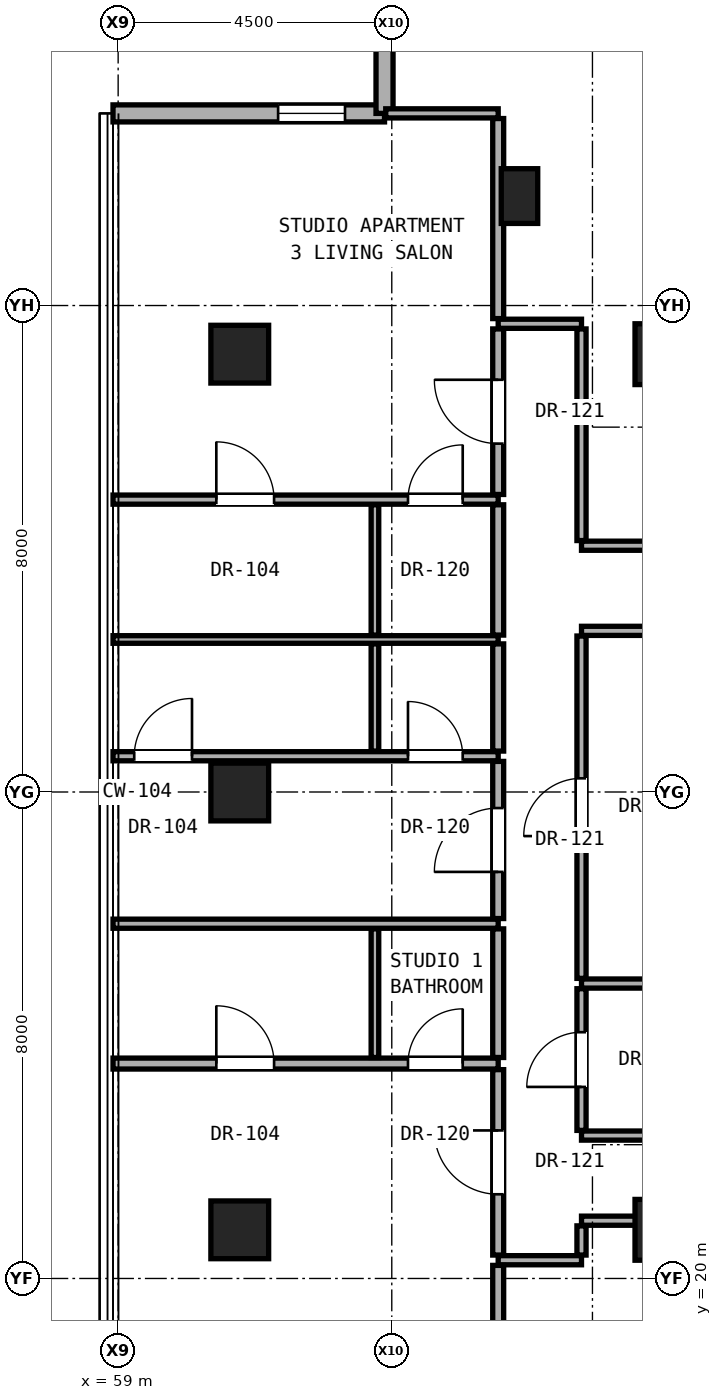
"""IFC4 building model, lengths in metres.
Left out: names, types, materials, properties, quantities, classifications, styles, units other than length and angle.
Written with IfcOpenShell. Run it as: python <this file> out.ifc"""

import sys

from ifc_helpers import new_model, si_unit, direction, frame, frame_2d, origin, origin_2d, place, context, subcontext, project, spatial, rectangle, hollow_rectangle, extrude, element, fill, save


model = new_model("IFC4")
c1 = context("Model", 3, precision=1e-05, world=origin(), true_north=direction((0.0, 1.0)))
c2 = subcontext(c1, "Body", "Model", "MODEL_VIEW")
j1 = project(units=[si_unit("LENGTHUNIT", "METRE"), si_unit("PLANEANGLEUNIT", "RADIAN")], contexts=[c1])
p1 = place(None, origin())
s1 = spatial("IfcSite", under=j1, at=p1, CompositionType="ELEMENT")
p2 = place(p1, origin())
s2 = spatial("IfcBuilding", under=s1, at=p2, CompositionType="ELEMENT")
p3 = place(p2, frame((0.0, 0.0, 167.4)))
s3 = spatial("IfcBuildingStorey", under=s2, at=p3, CompositionType="ELEMENT", Elevation=167.4)
for number, where, z_axis, x_axis in (
    (1, (68.0, 20.8, 0.0), (0.0, 0.0, 1.0), (1.0, 0.0, 0.0)),
    (2, (68.0, 35.2, 0.0), (0.0, 0.0, 1.0), (1.0, 0.0, 0.0)),
):
    element("IfcColumn", number, at=place(p3, frame(where, z_axis=z_axis, x_axis=x_axis)), inside=s3, PredefinedType="COLUMN", context=c2, shape_type="SweptSolid", body=[
        extrude(rectangle(XDim=1.0, YDim=1.0, at=origin_2d()), origin(), (0.0, 0.0, 1.0), 3.25),
    ])
for number, where, z_axis, x_axis in (
    (3, (61.0, 20.8, 0.0), (0.0, 0.0, 1.0), (1.0, 0.0, 0.0)),
    (4, (61.0, 28.0, 0.0), (0.0, 0.0, 1.0), (1.0, 0.0, 0.0)),
    (5, (61.0, 35.2, 0.0), (0.0, 0.0, 1.0), (1.0, 0.0, 0.0)),
):
    element("IfcColumn", number, at=place(p3, frame(where, z_axis=z_axis, x_axis=x_axis)), inside=s3, PredefinedType="COLUMN", context=c2, shape_type="SweptSolid", body=[
        extrude(hollow_rectangle(XDim=0.95, YDim=0.95, WallThickness=0.05, at=origin_2d()), origin(), (0.0, 0.0, 1.0), 3.25),
    ])
p4 = place(p3, frame((65.6, 37.8, 0.0), z_axis=(0.0, 0.0, 1.0), x_axis=(1.0, 0.0, 0.0)))
e6 = element("IfcColumn", 6, at=p4, inside=s3, PredefinedType="PILASTER", context=c2, shape_type="SweptSolid", body=[
    extrude(rectangle(XDim=0.6, YDim=0.9, at=origin_2d()), origin(), (0.0, 0.0, 1.0), 3.25),
])
p5 = place(p3, frame((63.381, 39.159, 0.0), z_axis=(0.0, 0.0, 1.0), x_axis=(-1.0, 0.0, 0.0)))
e7 = element("IfcWall", 7, at=p5, inside=s3, PredefinedType="SOLIDWALL", context=c2, shape_type="SweptSolid", body=[
    extrude(rectangle(XDim=4.465, YDim=0.28, at=frame_2d((2.232, 0.0))), origin(), (0.0, 0.0, 1.0), 3.03),
])
p6 = place(p5, frame((0.65, 0.0, 0.85)))
e8 = element("IfcOpeningElement", 8, at=p6, cuts=e7, PredefinedType="OPENING", context=c2, shape_type="SweptSolid", body=[
    extrude(rectangle(XDim=1.1, YDim=2.0, at=frame_2d((0.55, 1.0))), frame((0.0, 0.15, 0.0), z_axis=(0.0, -1.0, 0.0), x_axis=(1.0, 0.0, 0.0)), (0.0, 0.0, 1.0), 0.3),
])
p7 = place(p3, frame((63.381, 43.625, 0.0), z_axis=(0.0, 0.0, 1.0), x_axis=(0.0, -1.0, 0.0)))
e9 = element("IfcWall", 9, at=p7, inside=s3, PredefinedType="SOLIDWALL", context=c2, shape_type="SweptSolid", body=[
    extrude(rectangle(XDim=4.465, YDim=0.28, at=frame_2d((2.233, 0.0))), origin(), (0.0, 0.0, 1.0), 3.03),
])
p8 = place(p3, frame((65.25, 20.3, 0.0), z_axis=(0.0, 0.0, 1.0), x_axis=(1.0, 0.0, 0.0)))
e10 = element("IfcWall", 10, at=p8, inside=s3, PredefinedType="PARTITIONING", context=c2, shape_type="SweptSolid", body=[
    extrude(rectangle(XDim=1.37, YDim=0.15, at=frame_2d((0.685, 0.0))), origin(), (0.0, 0.0, 1.0), 3.05),
])
p9 = place(p3, frame((66.62, 20.95, 0.0), z_axis=(0.0, 0.0, 1.0), x_axis=(1.0, 0.0, 0.0)))
e11 = element("IfcWall", 11, at=p9, inside=s3, PredefinedType="PARTITIONING", context=c2, shape_type="SweptSolid", body=[
    extrude(rectangle(XDim=1.11, YDim=0.15, at=frame_2d((0.555, 0.0))), origin(), (0.0, 0.0, 1.0), 2.442),
])
p10 = place(p3, frame((66.62, 22.35, 0.0), z_axis=(0.0, 0.0, 1.0), x_axis=(1.0, 0.0, 0.0)))
e12 = element("IfcWall", 12, at=p10, inside=s3, PredefinedType="PARTITIONING", context=c2, shape_type="SweptSolid", body=[
    extrude(rectangle(XDim=10.14, YDim=0.15, at=frame_2d((5.07, 0.0))), origin(), (0.0, 0.0, 1.0), 2.186),
])
p11 = place(p3, frame((58.916, 23.534, 0.0), z_axis=(0.0, 0.0, 1.0), x_axis=(1.0, 0.0, 0.0)))
e13 = element("IfcWall", 13, at=p11, inside=s3, PredefinedType="PARTITIONING", context=c2, shape_type="SweptSolid", body=[
    extrude(rectangle(XDim=6.334, YDim=0.18, at=frame_2d((3.167, 0.0))), origin(), (0.0, 0.0, 1.0), 2.269),
])
p12 = place(p11, frame((1.698, 0.0, 0.0)))
e14 = element("IfcOpeningElement", 14, at=p12, cuts=e13, PredefinedType="OPENING", context=c2, shape_type="SweptSolid", body=[
    extrude(rectangle(XDim=0.95, YDim=2.15, at=frame_2d((0.475, 1.075))), frame((0.0, 0.1, 0.0), z_axis=(0.0, -1.0, 0.0), x_axis=(1.0, 0.0, 0.0)), (0.0, 0.0, 1.0), 0.2),
])
p13 = place(p11, frame((4.851, 0.0, 0.0)))
e15 = element("IfcOpeningElement", 15, at=p13, cuts=e13, PredefinedType="OPENING", context=c2, shape_type="SweptSolid", body=[
    extrude(rectangle(XDim=0.9, YDim=2.1, at=frame_2d((0.45, 1.05))), frame((0.0, 0.1, 0.0), z_axis=(0.0, -1.0, 0.0), x_axis=(1.0, 0.0, 0.0)), (0.0, 0.0, 1.0), 0.2),
])
p14 = place(p3, frame((66.62, 24.85, 0.0), z_axis=(0.0, 0.0, 1.0), x_axis=(1.0, 0.0, 0.0)))
e16 = element("IfcWall", 16, at=p14, inside=s3, PredefinedType="PARTITIONING", context=c2, shape_type="SweptSolid", body=[
    extrude(rectangle(XDim=3.13, YDim=0.15, at=frame_2d((1.565, 0.0))), origin(), (0.0, 0.0, 1.0), 2.186),
])
p15 = place(p3, frame((58.916, 25.834, 0.0), z_axis=(0.0, 0.0, 1.0), x_axis=(1.0, 0.0, 0.0)))
e17 = element("IfcWall", 17, at=p15, inside=s3, PredefinedType="PARTITIONING", context=c2, shape_type="SweptSolid", body=[
    extrude(rectangle(XDim=6.334, YDim=0.15, at=frame_2d((3.167, 0.0))), origin(), (0.0, 0.0, 1.0), 2.269),
])
p16 = place(p3, frame((58.916, 28.588, 0.0), z_axis=(0.0, 0.0, 1.0), x_axis=(1.0, 0.0, 0.0)))
e18 = element("IfcWall", 18, at=p16, inside=s3, PredefinedType="PARTITIONING", context=c2, shape_type="SweptSolid", body=[
    extrude(rectangle(XDim=6.334, YDim=0.15, at=frame_2d((3.167, 0.0))), origin(), (0.0, 0.0, 1.0), 2.269),
])
p17 = place(p16, frame((0.348, 0.0, 0.0)))
e19 = element("IfcOpeningElement", 19, at=p17, cuts=e18, PredefinedType="OPENING", context=c2, shape_type="SweptSolid", body=[
    extrude(rectangle(XDim=0.95, YDim=2.15, at=frame_2d((0.475, 1.075))), frame((0.0, 0.085, 0.0), z_axis=(0.0, -1.0, 0.0), x_axis=(1.0, 0.0, 0.0)), (0.0, 0.0, 1.0), 0.17),
])
p18 = place(p16, frame((4.851, 0.0, 0.0)))
e20 = element("IfcOpeningElement", 20, at=p18, cuts=e18, PredefinedType="OPENING", context=c2, shape_type="SweptSolid", body=[
    extrude(rectangle(XDim=0.9, YDim=2.1, at=frame_2d((0.45, 1.05))), frame((0.0, 0.085, 0.0), z_axis=(0.0, -1.0, 0.0), x_axis=(1.0, 0.0, 0.0)), (0.0, 0.0, 1.0), 0.17),
])
p19 = place(p3, frame((58.916, 30.508, 0.0), z_axis=(0.0, 0.0, 1.0), x_axis=(1.0, 0.0, 0.0)))
e21 = element("IfcWall", 21, at=p19, inside=s3, PredefinedType="PARTITIONING", context=c2, shape_type="SweptSolid", body=[
    extrude(rectangle(XDim=6.334, YDim=0.125, at=frame_2d((3.167, 0.0))), origin(), (0.0, 0.0, 1.0), 2.269),
])
p20 = place(p3, frame((66.62, 30.65, 0.0), z_axis=(0.0, 0.0, 1.0), x_axis=(1.0, 0.0, 0.0)))
e22 = element("IfcWall", 22, at=p20, inside=s3, PredefinedType="PARTITIONING", context=c2, shape_type="SweptSolid", body=[
    extrude(rectangle(XDim=10.14, YDim=0.15, at=frame_2d((5.07, 0.0))), origin(), (0.0, 0.0, 1.0), 2.186),
])
p21 = place(p20, frame((6.14, 0.0, 0.0)))
e23 = element("IfcOpeningElement", 23, at=p21, cuts=e22, PredefinedType="OPENING", context=c2, shape_type="SweptSolid", body=[
    extrude(rectangle(XDim=0.95, YDim=2.15, at=frame_2d((0.475, 1.075))), frame((0.0, 0.085, 0.0), z_axis=(0.0, -1.0, 0.0), x_axis=(1.0, 0.0, 0.0)), (0.0, 0.0, 1.0), 0.17),
])
p22 = place(p3, frame((66.62, 32.05, 0.0), z_axis=(0.0, 0.0, 1.0), x_axis=(1.0, 0.0, 0.0)))
e24 = element("IfcWall", 24, at=p22, inside=s3, PredefinedType="PARTITIONING", context=c2, shape_type="SweptSolid", body=[
    extrude(rectangle(XDim=2.18, YDim=0.15, at=frame_2d((1.09, 0.0))), origin(), (0.0, 0.0, 1.0), 2.186),
])
p23 = place(p3, frame((58.916, 32.808, 0.0), z_axis=(0.0, 0.0, 1.0), x_axis=(1.0, 0.0, 0.0)))
e25 = element("IfcWall", 25, at=p23, inside=s3, PredefinedType="PARTITIONING", context=c2, shape_type="SweptSolid", body=[
    extrude(rectangle(XDim=6.334, YDim=0.15, at=frame_2d((3.167, 0.0))), origin(), (0.0, 0.0, 1.0), 2.269),
])
p24 = place(p23, frame((1.698, 0.0, 0.0)))
e26 = element("IfcOpeningElement", 26, at=p24, cuts=e25, PredefinedType="OPENING", context=c2, shape_type="SweptSolid", body=[
    extrude(rectangle(XDim=0.95, YDim=2.15, at=frame_2d((0.475, 1.075))), frame((0.0, 0.085, 0.0), z_axis=(0.0, -1.0, 0.0), x_axis=(1.0, 0.0, 0.0)), (0.0, 0.0, 1.0), 0.17),
])
p25 = place(p23, frame((4.851, 0.0, 0.0)))
e27 = element("IfcOpeningElement", 27, at=p25, cuts=e25, PredefinedType="OPENING", context=c2, shape_type="SweptSolid", body=[
    extrude(rectangle(XDim=0.9, YDim=2.1, at=frame_2d((0.45, 1.05))), frame((0.0, 0.085, 0.0), z_axis=(0.0, -1.0, 0.0), x_axis=(1.0, 0.0, 0.0)), (0.0, 0.0, 1.0), 0.17),
])
p26 = place(p3, frame((65.25, 35.7, 0.0), z_axis=(0.0, 0.0, 1.0), x_axis=(1.0, 0.0, 0.0)))
e28 = element("IfcWall", 28, at=p26, inside=s3, PredefinedType="PARTITIONING", context=c2, shape_type="SweptSolid", body=[
    extrude(rectangle(XDim=1.37, YDim=0.15, at=frame_2d((0.685, 0.0))), origin(), (0.0, 0.0, 1.0), 3.05),
])
p27 = place(p3, frame((63.401, 39.16, 0.0), z_axis=(0.0, 0.0, 1.0), x_axis=(1.0, 0.0, 0.0)))
e29 = element("IfcWall", 29, at=p27, inside=s3, PredefinedType="PARTITIONING", context=c2, shape_type="SweptSolid", body=[
    extrude(rectangle(XDim=1.849, YDim=0.15, at=frame_2d((0.925, 0.0))), origin(), (0.0, 0.0, 1.0), 3.05),
])
p28 = place(p3, frame((63.223, 23.634, 0.0), z_axis=(0.0, 0.0, 1.0), x_axis=(0.0, 1.0, 0.0)))
e30 = element("IfcWall", 30, at=p28, inside=s3, PredefinedType="PARTITIONING", context=c2, shape_type="SweptSolid", body=[
    extrude(rectangle(XDim=2.115, YDim=0.125, at=frame_2d((1.058, 0.0))), origin(), (0.0, 0.0, 1.0), 3.05),
])
p29 = place(p3, frame((63.223, 28.673, 0.0), z_axis=(0.0, 0.0, 1.0), x_axis=(0.0, 1.0, 0.0)))
e31 = element("IfcWall", 31, at=p29, inside=s3, PredefinedType="PARTITIONING", context=c2, shape_type="SweptSolid", body=[
    extrude(rectangle(XDim=1.762, YDim=0.125, at=frame_2d((0.881, 0.0))), origin(), (0.0, 0.0, 1.0), 3.05),
])
p30 = place(p3, frame((63.223, 30.581, 0.0), z_axis=(0.0, 0.0, 1.0), x_axis=(0.0, 1.0, 0.0)))
e32 = element("IfcWall", 32, at=p30, inside=s3, PredefinedType="PARTITIONING", context=c2, shape_type="SweptSolid", body=[
    extrude(rectangle(XDim=2.142, YDim=0.125, at=frame_2d((1.071, 0.0))), origin(), (0.0, 0.0, 1.0), 3.05),
])
p31 = place(p3, frame((65.25, 16.94, 0.0), z_axis=(0.0, 0.0, 1.0), x_axis=(0.0, 1.0, 0.0)))
e33 = element("IfcWall", 33, at=p31, inside=s3, PredefinedType="PARTITIONING", context=c2, shape_type="SweptSolid", body=[
    extrude(rectangle(XDim=3.275, YDim=0.18, at=frame_2d((1.638, 0.0))), origin(), (0.0, 0.0, 1.0), 2.493),
])
p32 = place(p3, frame((65.25, 20.385, 0.0), z_axis=(0.0, 0.0, 1.0), x_axis=(0.0, 1.0, 0.0)))
e34 = element("IfcWall", 34, at=p32, inside=s3, PredefinedType="PARTITIONING", context=c2, shape_type="SweptSolid", body=[
    extrude(rectangle(XDim=3.049, YDim=0.18, at=frame_2d((1.524, 0.0))), origin(), (0.0, 0.0, 1.0), 2.442),
])
p33 = place(p32, frame((1.0, 0.0, 0.0)))
e35 = element("IfcOpeningElement", 35, at=p33, cuts=e34, PredefinedType="OPENING", context=c2, shape_type="SweptSolid", body=[
    extrude(rectangle(XDim=1.05, YDim=2.2, at=frame_2d((0.525, 1.1))), frame((0.0, 0.1, 0.0), z_axis=(0.0, -1.0, 0.0), x_axis=(1.0, 0.0, 0.0)), (0.0, 0.0, 1.0), 0.2),
])
p34 = place(p3, frame((65.25, 23.634, 0.0), z_axis=(0.0, 0.0, 1.0), x_axis=(0.0, 1.0, 0.0)))
e36 = element("IfcWall", 36, at=p34, inside=s3, PredefinedType="PARTITIONING", context=c2, shape_type="SweptSolid", body=[
    extrude(rectangle(XDim=2.115, YDim=0.18, at=frame_2d((1.058, 0.0))), origin(), (0.0, 0.0, 1.0), 3.05),
])
p35 = place(p3, frame((65.25, 25.919, 0.0), z_axis=(0.0, 0.0, 1.0), x_axis=(0.0, 1.0, 0.0)))
e37 = element("IfcWall", 37, at=p35, inside=s3, PredefinedType="PARTITIONING", context=c2, shape_type="SweptSolid", body=[
    extrude(rectangle(XDim=2.584, YDim=0.18, at=frame_2d((1.292, 0.0))), origin(), (0.0, 0.0, 1.0), 2.346),
])
p36 = place(p35, frame((0.767, 0.0, 0.0)))
e38 = element("IfcOpeningElement", 38, at=p36, cuts=e37, PredefinedType="OPENING", context=c2, shape_type="SweptSolid", body=[
    extrude(rectangle(XDim=1.05, YDim=2.2, at=frame_2d((0.525, 1.1))), frame((0.0, 0.1, 0.0), z_axis=(0.0, -1.0, 0.0), x_axis=(1.0, 0.0, 0.0)), (0.0, 0.0, 1.0), 0.2),
])
p37 = place(p3, frame((65.25, 28.673, 0.0), z_axis=(0.0, 0.0, 1.0), x_axis=(0.0, 1.0, 0.0)))
e39 = element("IfcWall", 39, at=p37, inside=s3, PredefinedType="PARTITIONING", context=c2, shape_type="SweptSolid", body=[
    extrude(rectangle(XDim=1.762, YDim=0.18, at=frame_2d((0.881, 0.0))), origin(), (0.0, 0.0, 1.0), 3.05),
])
p38 = place(p3, frame((65.25, 30.581, 0.0), z_axis=(0.0, 0.0, 1.0), x_axis=(0.0, 1.0, 0.0)))
e40 = element("IfcWall", 40, at=p38, inside=s3, PredefinedType="PARTITIONING", context=c2, shape_type="SweptSolid", body=[
    extrude(rectangle(XDim=2.142, YDim=0.18, at=frame_2d((1.071, 0.0))), origin(), (0.0, 0.0, 1.0), 3.05),
])
p39 = place(p3, frame((65.25, 32.893, 0.0), z_axis=(0.0, 0.0, 1.0), x_axis=(0.0, 1.0, 0.0)))
e41 = element("IfcWall", 41, at=p39, inside=s3, PredefinedType="PARTITIONING", context=c2, shape_type="SweptSolid", body=[
    extrude(rectangle(XDim=2.722, YDim=0.18, at=frame_2d((1.361, 0.0))), origin(), (0.0, 0.0, 1.0), 2.442),
])
p40 = place(p39, frame((0.836, 0.0, 0.0)))
e42 = element("IfcOpeningElement", 42, at=p40, cuts=e41, PredefinedType="OPENING", context=c2, shape_type="SweptSolid", body=[
    extrude(rectangle(XDim=1.05, YDim=2.2, at=frame_2d((0.525, 1.1))), frame((0.0, 0.1, 0.0), z_axis=(0.0, -1.0, 0.0), x_axis=(1.0, 0.0, 0.0)), (0.0, 0.0, 1.0), 0.2),
])
p41 = place(p3, frame((65.25, 35.785, 0.0), z_axis=(0.0, 0.0, 1.0), x_axis=(0.0, 1.0, 0.0)))
e43 = element("IfcWall", 43, at=p41, inside=s3, PredefinedType="PARTITIONING", context=c2, shape_type="SweptSolid", body=[
    extrude(rectangle(XDim=3.29, YDim=0.18, at=frame_2d((1.645, 0.0))), origin(), (0.0, 0.0, 1.0), 2.493),
])
p42 = place(p3, frame((66.62, 20.385, 0.0), z_axis=(0.0, 0.0, 1.0), x_axis=(0.0, 1.0, 0.0)))
e44 = element("IfcWall", 44, at=p42, inside=s3, PredefinedType="PARTITIONING", context=c2, shape_type="SweptSolid", body=[
    extrude(rectangle(XDim=0.48, YDim=0.15, at=frame_2d((0.24, 0.0))), origin(), (0.0, 0.0, 1.0), 2.442),
])
p43 = place(p3, frame((66.62, 22.435, 0.0), z_axis=(0.0, 0.0, 1.0), x_axis=(0.0, 1.0, 0.0)))
e45 = element("IfcWall", 45, at=p43, inside=s3, PredefinedType="PARTITIONING", context=c2, shape_type="SweptSolid", body=[
    extrude(rectangle(XDim=2.33, YDim=0.15, at=frame_2d((1.165, 0.0))), origin(), (0.0, 0.0, 1.0), 3.05),
])
p44 = place(p43, frame((0.715, 0.0, 0.0)))
e46 = element("IfcOpeningElement", 46, at=p44, cuts=e45, PredefinedType="OPENING", context=c2, shape_type="SweptSolid", body=[
    extrude(rectangle(XDim=0.9, YDim=2.1, at=frame_2d((0.45, 1.05))), frame((0.0, 0.085, 0.0), z_axis=(0.0, -1.0, 0.0), x_axis=(1.0, 0.0, 0.0)), (0.0, 0.0, 1.0), 0.17),
])
p45 = place(p3, frame((66.62, 24.935, 0.0), z_axis=(0.0, 0.0, 1.0), x_axis=(0.0, 1.0, 0.0)))
e47 = element("IfcWall", 47, at=p45, inside=s3, PredefinedType="PARTITIONING", context=c2, shape_type="SweptSolid", body=[
    extrude(rectangle(XDim=5.63, YDim=0.15, at=frame_2d((2.815, 0.0))), origin(), (0.0, 0.0, 1.0), 2.346),
])
p46 = place(p45, frame((2.34, 0.0, 0.0)))
e48 = element("IfcOpeningElement", 48, at=p46, cuts=e47, PredefinedType="OPENING", context=c2, shape_type="SweptSolid", body=[
    extrude(rectangle(XDim=0.95, YDim=2.15, at=frame_2d((0.475, 1.075))), frame((0.0, 0.085, 0.0), z_axis=(0.0, -1.0, 0.0), x_axis=(1.0, 0.0, 0.0)), (0.0, 0.0, 1.0), 0.17),
])
p47 = place(p3, frame((66.62, 32.135, 0.0), z_axis=(0.0, 0.0, 1.0), x_axis=(0.0, 1.0, 0.0)))
e49 = element("IfcWall", 49, at=p47, inside=s3, PredefinedType="PARTITIONING", context=c2, shape_type="SweptSolid", body=[
    extrude(rectangle(XDim=3.48, YDim=0.15, at=frame_2d((1.74, 0.0))), origin(), (0.0, 0.0, 1.0), 2.442),
])
p48 = place(p6, origin())
e50 = element("IfcWindow", 50, at=p48, inside=s3, PartitioningType="SINGLE_PANEL", PredefinedType="WINDOW", context=c2, shape_type="SweptSolid", body=[
    extrude(rectangle(XDim=1.1, YDim=2.0, at=frame_2d((0.55, 1.0))), frame((0.0, 0.03, 0.0), z_axis=(0.0, -1.0, 0.0), x_axis=(1.0, 0.0, 0.0)), (0.0, 0.0, 1.0), 0.06),
])
fill(e8, e50)
p49 = place(p44, origin())
e51 = element("IfcDoor", 51, at=p49, inside=s3, OperationType="SINGLE_SWING_LEFT", PredefinedType="DOOR", context=c2, shape_type="SweptSolid", body=[
    extrude(rectangle(XDim=0.9, YDim=2.1, at=frame_2d((0.45, 1.05))), frame((0.0, 0.025, 0.0), z_axis=(0.0, -1.0, 0.0), x_axis=(1.0, 0.0, 0.0)), (0.0, 0.0, 1.0), 0.05),
])
fill(e46, e51)
p50 = place(p33, origin())
e52 = element("IfcDoor", 52, at=p50, inside=s3, OperationType="SINGLE_SWING_RIGHT", PredefinedType="DOOR", context=c2, shape_type="SweptSolid", body=[
    extrude(rectangle(XDim=1.05, YDim=2.2, at=frame_2d((0.525, 1.1))), frame((0.0, 0.025, 0.0), z_axis=(0.0, -1.0, 0.0), x_axis=(1.0, 0.0, 0.0)), (0.0, 0.0, 1.0), 0.05),
])
fill(e35, e52)
p51 = place(p12, origin())
e53 = element("IfcDoor", 53, at=p51, inside=s3, OperationType="SINGLE_SWING_LEFT", PredefinedType="DOOR", context=c2, shape_type="SweptSolid", body=[
    extrude(rectangle(XDim=0.95, YDim=2.15, at=frame_2d((0.475, 1.075))), frame((0.0, 0.025, 0.0), z_axis=(0.0, -1.0, 0.0), x_axis=(1.0, 0.0, 0.0)), (0.0, 0.0, 1.0), 0.05),
])
fill(e14, e53)
p52 = place(p13, origin())
e54 = element("IfcDoor", 54, at=p52, inside=s3, OperationType="SINGLE_SWING_RIGHT", PredefinedType="DOOR", context=c2, shape_type="SweptSolid", body=[
    extrude(rectangle(XDim=0.9, YDim=2.1, at=frame_2d((0.45, 1.05))), frame((0.0, 0.025, 0.0), z_axis=(0.0, -1.0, 0.0), x_axis=(1.0, 0.0, 0.0)), (0.0, 0.0, 1.0), 0.05),
])
fill(e15, e54)
p53 = place(p36, origin())
e55 = element("IfcDoor", 55, at=p53, inside=s3, OperationType="SINGLE_SWING_LEFT", PredefinedType="DOOR", context=c2, shape_type="SweptSolid", body=[
    extrude(rectangle(XDim=1.05, YDim=2.2, at=frame_2d((0.525, 1.1))), frame((0.0, 0.025, 0.0), z_axis=(0.0, -1.0, 0.0), x_axis=(1.0, 0.0, 0.0)), (0.0, 0.0, 1.0), 0.05),
])
fill(e38, e55)
p54 = place(p17, origin())
e56 = element("IfcDoor", 56, at=p54, inside=s3, OperationType="SINGLE_SWING_RIGHT", PredefinedType="DOOR", context=c2, shape_type="SweptSolid", body=[
    extrude(rectangle(XDim=0.95, YDim=2.15, at=frame_2d((0.475, 1.075))), frame((0.0, 0.025, 0.0), z_axis=(0.0, -1.0, 0.0), x_axis=(1.0, 0.0, 0.0)), (0.0, 0.0, 1.0), 0.05),
])
fill(e19, e56)
p55 = place(p18, origin())
e57 = element("IfcDoor", 57, at=p55, inside=s3, OperationType="SINGLE_SWING_LEFT", PredefinedType="DOOR", context=c2, shape_type="SweptSolid", body=[
    extrude(rectangle(XDim=0.9, YDim=2.1, at=frame_2d((0.45, 1.05))), frame((0.0, 0.025, 0.0), z_axis=(0.0, -1.0, 0.0), x_axis=(1.0, 0.0, 0.0)), (0.0, 0.0, 1.0), 0.05),
])
fill(e20, e57)
p56 = place(p40, origin())
e58 = element("IfcDoor", 58, at=p56, inside=s3, OperationType="SINGLE_SWING_RIGHT", PredefinedType="DOOR", context=c2, shape_type="SweptSolid", body=[
    extrude(rectangle(XDim=1.05, YDim=2.2, at=frame_2d((0.525, 1.1))), frame((0.0, 0.025, 0.0), z_axis=(0.0, -1.0, 0.0), x_axis=(1.0, 0.0, 0.0)), (0.0, 0.0, 1.0), 0.05),
])
fill(e42, e58)
p57 = place(p24, origin())
e59 = element("IfcDoor", 59, at=p57, inside=s3, OperationType="SINGLE_SWING_LEFT", PredefinedType="DOOR", context=c2, shape_type="SweptSolid", body=[
    extrude(rectangle(XDim=0.95, YDim=2.15, at=frame_2d((0.475, 1.075))), frame((0.0, 0.025, 0.0), z_axis=(0.0, -1.0, 0.0), x_axis=(1.0, 0.0, 0.0)), (0.0, 0.0, 1.0), 0.05),
])
fill(e26, e59)
p58 = place(p25, origin())
e60 = element("IfcDoor", 60, at=p58, inside=s3, OperationType="SINGLE_SWING_RIGHT", PredefinedType="DOOR", context=c2, shape_type="SweptSolid", body=[
    extrude(rectangle(XDim=0.9, YDim=2.1, at=frame_2d((0.45, 1.05))), frame((0.0, 0.025, 0.0), z_axis=(0.0, -1.0, 0.0), x_axis=(1.0, 0.0, 0.0)), (0.0, 0.0, 1.0), 0.05),
])
fill(e27, e60)
p59 = place(p46, origin())
e61 = element("IfcDoor", 61, at=p59, inside=s3, OperationType="SINGLE_SWING_LEFT", PredefinedType="DOOR", context=c2, shape_type="SweptSolid", body=[
    extrude(rectangle(XDim=0.95, YDim=2.15, at=frame_2d((0.475, 1.075))), frame((0.0, 0.025, 0.0), z_axis=(0.0, -1.0, 0.0), x_axis=(1.0, 0.0, 0.0)), (0.0, 0.0, 1.0), 0.05),
])
fill(e48, e61)
save(model, sys.argv[1])
